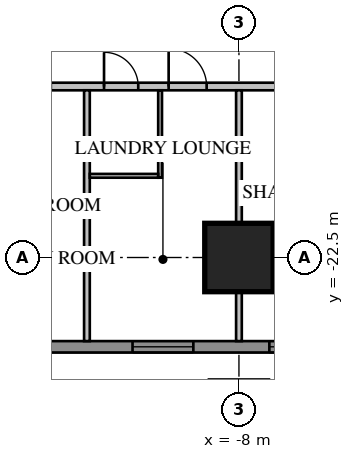
"""IFC4 building model, lengths in metres.
Left out: names, types, materials, properties, quantities, classifications, styles, units other than length and angle.
Written with IfcOpenShell. Run it as: python <this file> out.ifc"""

import sys

from ifc_helpers import new_model, si_unit, direction, frame, frame_2d, origin, origin_2d, place, context, subcontext, project, spatial, rectangle, extrude, element, fill, save


model = new_model("IFC4")
c1 = context("Model", 3, precision=1e-05, world=origin(), true_north=direction((0.0, 1.0)))
c2 = subcontext(c1, "Body", "Model", "MODEL_VIEW")
j1 = project(units=[si_unit("LENGTHUNIT", "METRE"), si_unit("PLANEANGLEUNIT", "RADIAN")], contexts=[c1])
p1 = place(None, origin())
s1 = spatial("IfcSite", under=j1, at=p1, CompositionType="ELEMENT")
p2 = place(p1, origin())
s2 = spatial("IfcBuilding", under=s1, at=p2, CompositionType="ELEMENT")
p3 = place(p2, frame((0.0, 0.0, 50.65)))
s3 = spatial("IfcBuildingStorey", under=s2, at=p3, CompositionType="ELEMENT", Elevation=50.65)
p4 = place(p3, frame((-8.0, -22.5, 0.0), z_axis=(0.0, 0.0, 1.0), x_axis=(1.0, 0.0, 0.0)))
e1 = element("IfcColumn", 1, at=p4, inside=s3, PredefinedType="COLUMN", context=c2, shape_type="SweptSolid", body=[
    extrude(rectangle(XDim=1.8, YDim=1.8, at=origin_2d()), origin(), (0.0, 0.0, 1.0), 3.413),
])
p5 = place(p3, frame((-16.0, -24.85, 0.0), z_axis=(0.0, 0.0, 1.0), x_axis=(1.0, 0.0, 0.0)))
e2 = element("IfcWall", 2, at=p5, inside=s3, PredefinedType="SOLIDWALL", context=c2, shape_type="SweptSolid", body=[
    extrude(rectangle(XDim=32.0, YDim=0.3, at=frame_2d((16.0, 0.0))), origin(), (0.0, 0.0, 1.0), 3.65),
])
p6 = place(p5, frame((1.2, 0.0, 0.75)))
e3 = element("IfcOpeningElement", 3, at=p6, cuts=e2, PredefinedType="OPENING", context=c2, shape_type="SweptSolid", body=[
    extrude(rectangle(XDim=1.6, YDim=1.8, at=frame_2d((0.8, 0.9))), frame((0.0, 0.17, 0.0), z_axis=(0.0, -1.0, 0.0), x_axis=(1.0, 0.0, 0.0)), (0.0, 0.0, 1.0), 0.34),
])
p7 = place(p5, frame((5.2, 0.0, 0.75)))
e4 = element("IfcOpeningElement", 4, at=p7, cuts=e2, PredefinedType="OPENING", context=c2, shape_type="SweptSolid", body=[
    extrude(rectangle(XDim=1.6, YDim=1.8, at=frame_2d((0.8, 0.9))), frame((0.0, 0.17, 0.0), z_axis=(0.0, -1.0, 0.0), x_axis=(1.0, 0.0, 0.0)), (0.0, 0.0, 1.0), 0.34),
])
p8 = place(p5, frame((17.2, 0.0, 0.75)))
e5 = element("IfcOpeningElement", 5, at=p8, cuts=e2, PredefinedType="OPENING", context=c2, shape_type="SweptSolid", body=[
    extrude(rectangle(XDim=1.6, YDim=1.8, at=frame_2d((0.8, 0.9))), frame((0.0, 0.17, 0.0), z_axis=(0.0, -1.0, 0.0), x_axis=(1.0, 0.0, 0.0)), (0.0, 0.0, 1.0), 0.34),
])
p9 = place(p5, frame((21.2, 0.0, 0.75)))
e6 = element("IfcOpeningElement", 6, at=p9, cuts=e2, PredefinedType="OPENING", context=c2, shape_type="SweptSolid", body=[
    extrude(rectangle(XDim=1.6, YDim=1.8, at=frame_2d((0.8, 0.9))), frame((0.0, 0.17, 0.0), z_axis=(0.0, -1.0, 0.0), x_axis=(1.0, 0.0, 0.0)), (0.0, 0.0, 1.0), 0.34),
])
p10 = place(p5, frame((25.2, 0.0, 0.75)))
e7 = element("IfcOpeningElement", 7, at=p10, cuts=e2, PredefinedType="OPENING", context=c2, shape_type="SweptSolid", body=[
    extrude(rectangle(XDim=1.6, YDim=1.8, at=frame_2d((0.8, 0.9))), frame((0.0, 0.17, 0.0), z_axis=(0.0, -1.0, 0.0), x_axis=(1.0, 0.0, 0.0)), (0.0, 0.0, 1.0), 0.34),
])
p11 = place(p5, frame((29.2, 0.0, 0.75)))
e8 = element("IfcOpeningElement", 8, at=p11, cuts=e2, PredefinedType="OPENING", context=c2, shape_type="SweptSolid", body=[
    extrude(rectangle(XDim=1.6, YDim=1.8, at=frame_2d((0.8, 0.9))), frame((0.0, 0.17, 0.0), z_axis=(0.0, -1.0, 0.0), x_axis=(1.0, 0.0, 0.0)), (0.0, 0.0, 1.0), 0.34),
])
p12 = place(p5, frame((8.8, 0.0, 0.75)))
e9 = element("IfcOpeningElement", 9, at=p12, cuts=e2, PredefinedType="OPENING", context=c2, shape_type="SweptSolid", body=[
    extrude(rectangle(XDim=2.4, YDim=1.8, at=frame_2d((1.2, 0.9))), frame((0.0, 0.17, 0.0), z_axis=(0.0, -1.0, 0.0), x_axis=(1.0, 0.0, 0.0)), (0.0, 0.0, 1.0), 0.34),
])
p13 = place(p5, frame((13.812, 0.0, 0.0)))
e10 = element("IfcOpeningElement", 10, at=p13, cuts=e2, PredefinedType="OPENING", context=c2, shape_type="SweptSolid", body=[
    extrude(rectangle(XDim=1.0, YDim=2.4, at=frame_2d((0.5, 1.2))), frame((0.0, 0.17, 0.0), z_axis=(0.0, -1.0, 0.0), x_axis=(1.0, 0.0, 0.0)), (0.0, 0.0, 1.0), 0.34),
])
p14 = place(p3, frame((-18.0, -18.0, 0.0), z_axis=(0.0, 0.0, 1.0), x_axis=(1.0, 0.0, 0.0)))
e11 = element("IfcWall", 11, at=p14, inside=s3, PredefinedType="PARTITIONING", context=c2, shape_type="SweptSolid", body=[
    extrude(rectangle(XDim=36.0, YDim=0.2, at=frame_2d((18.0, 0.0))), origin(), (0.0, 0.0, 1.0), 3.65),
])
p15 = place(p14, frame((0.375, 0.0, 0.0)))
e12 = element("IfcOpeningElement", 12, at=p15, cuts=e11, PredefinedType="OPENING", context=c2, shape_type="SweptSolid", body=[
    extrude(rectangle(XDim=1.0, YDim=2.1, at=frame_2d((0.5, 1.05))), frame((0.0, 0.12, 0.0), z_axis=(0.0, -1.0, 0.0), x_axis=(1.0, 0.0, 0.0)), (0.0, 0.0, 1.0), 0.24),
])
p16 = place(p14, frame((2.45, 0.0, 0.0)))
e13 = element("IfcOpeningElement", 13, at=p16, cuts=e11, PredefinedType="OPENING", context=c2, shape_type="SweptSolid", body=[
    extrude(rectangle(XDim=0.8, YDim=2.1, at=frame_2d((0.4, 1.05))), frame((0.0, 0.12, 0.0), z_axis=(0.0, -1.0, 0.0), x_axis=(1.0, 0.0, 0.0)), (0.0, 0.0, 1.0), 0.24),
])
p17 = place(p14, frame((4.05, 0.0, 0.0)))
e14 = element("IfcOpeningElement", 14, at=p17, cuts=e11, PredefinedType="OPENING", context=c2, shape_type="SweptSolid", body=[
    extrude(rectangle(XDim=1.0, YDim=2.1, at=frame_2d((0.5, 1.05))), frame((0.0, 0.12, 0.0), z_axis=(0.0, -1.0, 0.0), x_axis=(1.0, 0.0, 0.0)), (0.0, 0.0, 1.0), 0.24),
])
p18 = place(p14, frame((6.45, 0.0, 0.0)))
e15 = element("IfcOpeningElement", 15, at=p18, cuts=e11, PredefinedType="OPENING", context=c2, shape_type="SweptSolid", body=[
    extrude(rectangle(XDim=0.9, YDim=2.1, at=frame_2d((0.45, 1.05))), frame((0.0, 0.12, 0.0), z_axis=(0.0, -1.0, 0.0), x_axis=(1.0, 0.0, 0.0)), (0.0, 0.0, 1.0), 0.24),
])
p19 = place(p14, frame((8.15, 0.0, 0.0)))
e16 = element("IfcOpeningElement", 16, at=p19, cuts=e11, PredefinedType="OPENING", context=c2, shape_type="SweptSolid", body=[
    extrude(rectangle(XDim=1.0, YDim=2.1, at=frame_2d((0.5, 1.05))), frame((0.0, 0.12, 0.0), z_axis=(0.0, -1.0, 0.0), x_axis=(1.0, 0.0, 0.0)), (0.0, 0.0, 1.0), 0.24),
])
p20 = place(p14, frame((19.95, 0.0, 0.0)))
e17 = element("IfcOpeningElement", 17, at=p20, cuts=e11, PredefinedType="OPENING", context=c2, shape_type="SweptSolid", body=[
    extrude(rectangle(XDim=0.95, YDim=2.1, at=frame_2d((0.475, 1.05))), frame((0.0, 0.12, 0.0), z_axis=(0.0, -1.0, 0.0), x_axis=(1.0, 0.0, 0.0)), (0.0, 0.0, 1.0), 0.24),
])
p21 = place(p14, frame((23.95, 0.0, 0.0)))
e18 = element("IfcOpeningElement", 18, at=p21, cuts=e11, PredefinedType="OPENING", context=c2, shape_type="SweptSolid", body=[
    extrude(rectangle(XDim=0.95, YDim=2.1, at=frame_2d((0.475, 1.05))), frame((0.0, 0.12, 0.0), z_axis=(0.0, -1.0, 0.0), x_axis=(1.0, 0.0, 0.0)), (0.0, 0.0, 1.0), 0.24),
])
p22 = place(p14, frame((27.95, 0.0, 0.0)))
e19 = element("IfcOpeningElement", 19, at=p22, cuts=e11, PredefinedType="OPENING", context=c2, shape_type="SweptSolid", body=[
    extrude(rectangle(XDim=0.95, YDim=2.1, at=frame_2d((0.475, 1.05))), frame((0.0, 0.12, 0.0), z_axis=(0.0, -1.0, 0.0), x_axis=(1.0, 0.0, 0.0)), (0.0, 0.0, 1.0), 0.24),
])
p23 = place(p14, frame((31.95, 0.0, 0.0)))
e20 = element("IfcOpeningElement", 20, at=p23, cuts=e11, PredefinedType="OPENING", context=c2, shape_type="SweptSolid", body=[
    extrude(rectangle(XDim=0.95, YDim=2.1, at=frame_2d((0.475, 1.05))), frame((0.0, 0.12, 0.0), z_axis=(0.0, -1.0, 0.0), x_axis=(1.0, 0.0, 0.0)), (0.0, 0.0, 1.0), 0.24),
])
p24 = place(p14, frame((34.375, 0.0, 0.0)))
e21 = element("IfcOpeningElement", 21, at=p24, cuts=e11, PredefinedType="OPENING", context=c2, shape_type="SweptSolid", body=[
    extrude(rectangle(XDim=0.95, YDim=2.1, at=frame_2d((0.475, 1.05))), frame((0.0, 0.12, 0.0), z_axis=(0.0, -1.0, 0.0), x_axis=(1.0, 0.0, 0.0)), (0.0, 0.0, 1.0), 0.24),
])
p25 = place(p14, frame((11.2, 0.0, 0.0)))
e22 = element("IfcOpeningElement", 22, at=p25, cuts=e11, PredefinedType="OPENING", context=c2, shape_type="SweptSolid", body=[
    extrude(rectangle(XDim=1.0, YDim=2.1, at=frame_2d((0.5, 1.05))), frame((0.0, 0.12, 0.0), z_axis=(0.0, -1.0, 0.0), x_axis=(1.0, 0.0, 0.0)), (0.0, 0.0, 1.0), 0.24),
])
for number, where, z_axis, x_axis in (
    (23, (-12.0, -18.1, 0.0), (0.0, 0.0, 1.0), (0.0, -1.0, 0.0)),
    (24, (-8.0, -18.1, 0.0), (0.0, 0.0, 1.0), (0.0, -1.0, 0.0)),
):
    element("IfcWall", number, at=place(p3, frame(where, z_axis=z_axis, x_axis=x_axis)), inside=s3, PredefinedType="PARTITIONING", context=c2, shape_type="SweptSolid", body=[
        extrude(rectangle(XDim=6.6, YDim=0.15, at=frame_2d((3.3, 0.0))), origin(), (0.0, 0.0, 1.0), 3.65),
    ])
p26 = place(p3, frame((-10.075, -18.1, 0.0), z_axis=(0.0, 0.0, 1.0), x_axis=(0.0, -1.0, 0.0)))
e25 = element("IfcWall", 25, at=p26, inside=s3, PredefinedType="PARTITIONING", context=c2, shape_type="SweptSolid", body=[
    extrude(rectangle(XDim=2.3, YDim=0.1, at=frame_2d((1.15, 0.0))), origin(), (0.0, 0.0, 1.0), 3.65),
])
p27 = place(p3, frame((-11.925, -20.35, 0.0), z_axis=(0.0, 0.0, 1.0), x_axis=(1.0, 0.0, 0.0)))
e26 = element("IfcWall", 26, at=p27, inside=s3, PredefinedType="PARTITIONING", context=c2, shape_type="SweptSolid", body=[
    extrude(rectangle(XDim=1.8, YDim=0.1, at=frame_2d((0.9, 0.0))), origin(), (0.0, 0.0, 1.0), 3.65),
])
p28 = place(p7, origin())
e27 = element("IfcWindow", 27, at=p28, inside=s3, PartitioningType="SINGLE_PANEL", PredefinedType="WINDOW", context=c2, shape_type="SweptSolid", body=[
    extrude(rectangle(XDim=1.6, YDim=1.8, at=frame_2d((0.8, 0.9))), frame((0.0, 0.03, 0.0), z_axis=(0.0, -1.0, 0.0), x_axis=(1.0, 0.0, 0.0)), (0.0, 0.0, 1.0), 0.06),
])
fill(e4, e27)
p29 = place(p12, origin())
e28 = element("IfcWindow", 28, at=p29, inside=s3, PartitioningType="SINGLE_PANEL", PredefinedType="WINDOW", context=c2, shape_type="SweptSolid", body=[
    extrude(rectangle(XDim=2.4, YDim=1.8, at=frame_2d((1.2, 0.9))), frame((0.0, 0.03, 0.0), z_axis=(0.0, -1.0, 0.0), x_axis=(1.0, 0.0, 0.0)), (0.0, 0.0, 1.0), 0.06),
])
fill(e9, e28)
p30 = place(p18, origin())
e29 = element("IfcDoor", 29, at=p30, inside=s3, OperationType="SINGLE_SWING_LEFT", PredefinedType="DOOR", context=c2, shape_type="SweptSolid", body=[
    extrude(rectangle(XDim=0.9, YDim=2.1, at=frame_2d((0.45, 1.05))), frame((0.0, 0.025, 0.0), z_axis=(0.0, -1.0, 0.0), x_axis=(1.0, 0.0, 0.0)), (0.0, 0.0, 1.0), 0.05),
])
fill(e15, e29)
p31 = place(p19, origin())
e30 = element("IfcDoor", 30, at=p31, inside=s3, OperationType="SINGLE_SWING_LEFT", PredefinedType="DOOR", context=c2, shape_type="SweptSolid", body=[
    extrude(rectangle(XDim=1.0, YDim=2.1, at=frame_2d((0.5, 1.05))), frame((0.0, 0.025, 0.0), z_axis=(0.0, -1.0, 0.0), x_axis=(1.0, 0.0, 0.0)), (0.0, 0.0, 1.0), 0.05),
])
fill(e16, e30)
save(model, sys.argv[1])
